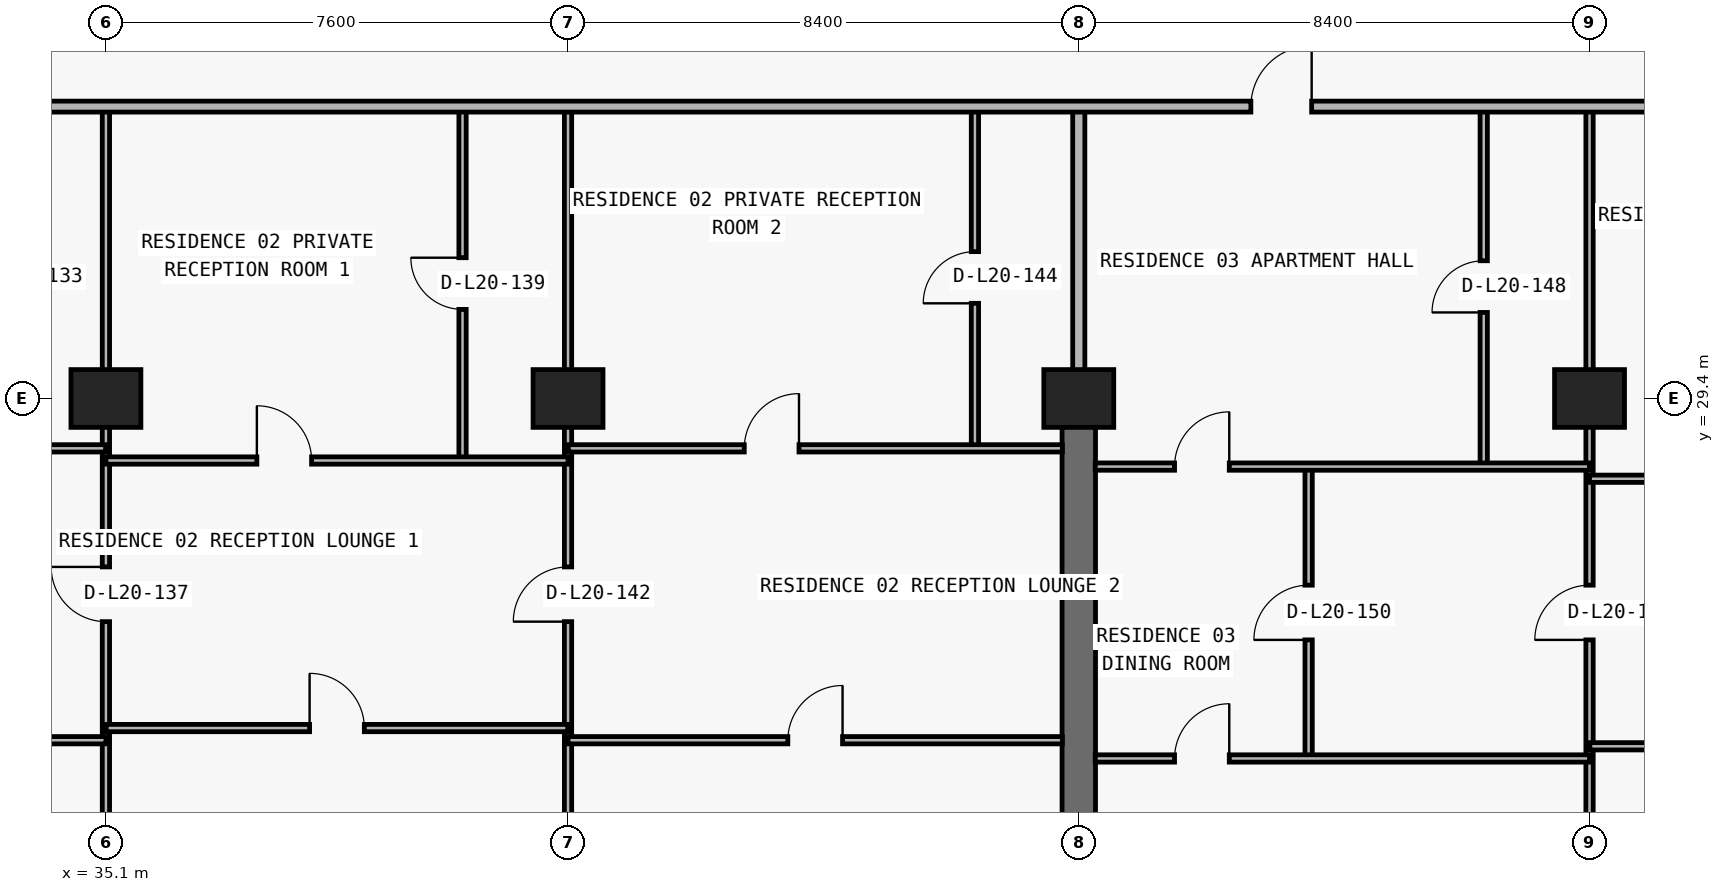
"""IFC4 building model, lengths in metres.
Left out: names, types, materials, properties, quantities, classifications, styles, units other than length and angle.
Written with IfcOpenShell. Run it as: python <this file> out.ifc"""

import sys

from ifc_helpers import new_model, si_unit, direction, frame, frame_2d, origin, origin_2d, place, context, subcontext, project, spatial, rectangle, extrude, element, fill, save


model = new_model("IFC4")
c1 = context("Model", 3, precision=1e-05, world=origin(), true_north=direction((0.0, 1.0)))
c2 = subcontext(c1, "Body", "Model", "MODEL_VIEW")
j1 = project(units=[si_unit("LENGTHUNIT", "METRE"), si_unit("PLANEANGLEUNIT", "RADIAN")], contexts=[c1])
p1 = place(None, origin())
s1 = spatial("IfcSite", under=j1, at=p1, CompositionType="ELEMENT")
p2 = place(p1, origin())
s2 = spatial("IfcBuilding", under=s1, at=p2, CompositionType="ELEMENT")
p3 = place(p2, frame((0.0, 0.0, 76.2)))
s3 = spatial("IfcBuildingStorey", under=s2, at=p3, CompositionType="ELEMENT", Elevation=76.2)
for number, where, z_axis, x_axis in (
    (1, (35.1, 29.4, 0.0), (0.0, 0.0, 1.0), (1.0, 0.0, 0.0)),
    (2, (42.7, 29.4, 0.0), (0.0, 0.0, 1.0), (1.0, 0.0, 0.0)),
    (3, (51.1, 29.4, 0.0), (0.0, 0.0, 1.0), (1.0, 0.0, 0.0)),
    (4, (59.5, 29.4, 0.0), (0.0, 0.0, 1.0), (1.0, 0.0, 0.0)),
):
    element("IfcColumn", number, at=place(p3, frame(where, z_axis=z_axis, x_axis=x_axis)), inside=s3, PredefinedType="COLUMN", context=c2, shape_type="SweptSolid", body=[
        extrude(rectangle(XDim=1.15, YDim=0.95, at=origin_2d()), origin(), (0.0, 0.0, 1.0), 3.0),
    ])
p4 = place(p3, frame((51.1, 20.8, 0.0), z_axis=(0.0, 0.0, 1.0), x_axis=(0.0, 1.0, 0.0)))
e5 = element("IfcWall", 5, at=p4, inside=s3, PredefinedType="SHEAR", context=c2, shape_type="SweptSolid", body=[
    extrude(rectangle(XDim=8.6, YDim=0.55, at=frame_2d((4.3, 0.0))), origin(), (0.0, 0.0, 1.0), 3.0),
])
p5 = place(p3, frame((35.1, 6.24, 0.0), z_axis=(0.0, 0.0, 1.0), x_axis=(0.0, 1.0, 0.0)))
e6 = element("IfcWall", 6, at=p5, inside=s3, PredefinedType="PARTITIONING", context=c2, shape_type="SweptSolid", body=[
    extrude(rectangle(XDim=27.96, YDim=0.12, at=frame_2d((13.98, 0.0))), origin(), (0.0, 0.0, 1.0), 2.06),
])
p6 = place(p5, frame((19.49, 0.0, 0.0)))
e7 = element("IfcOpeningElement", 7, at=p6, cuts=e6, PredefinedType="OPENING", context=c2, shape_type="SweptSolid", body=[
    extrude(rectangle(XDim=0.9, YDim=2.01, at=frame_2d((0.45, 1.005))), frame((0.0, 0.07, 0.0), z_axis=(0.0, -1.0, 0.0), x_axis=(1.0, 0.0, 0.0)), (0.0, 0.0, 1.0), 0.14),
])
p7 = place(p3, frame((40.965, 28.38, 0.0), z_axis=(0.0, 0.0, 1.0), x_axis=(0.0, 1.0, 0.0)))
e8 = element("IfcWall", 8, at=p7, inside=s3, PredefinedType="PARTITIONING", context=c2, shape_type="SweptSolid", body=[
    extrude(rectangle(XDim=5.82, YDim=0.12, at=frame_2d((2.91, 0.0))), origin(), (0.0, 0.0, 1.0), 3.0),
])
p8 = place(p7, frame((2.485, 0.0, 0.0)))
e9 = element("IfcOpeningElement", 9, at=p8, cuts=e8, PredefinedType="OPENING", context=c2, shape_type="SweptSolid", body=[
    extrude(rectangle(XDim=0.85, YDim=2.1, at=frame_2d((0.425, 1.05))), frame((0.0, 0.07, 0.0), z_axis=(0.0, -1.0, 0.0), x_axis=(1.0, 0.0, 0.0)), (0.0, 0.0, 1.0), 0.14),
])
p9 = place(p3, frame((42.7, 6.24, 0.0), z_axis=(0.0, 0.0, 1.0), x_axis=(0.0, 1.0, 0.0)))
e10 = element("IfcWall", 10, at=p9, inside=s3, PredefinedType="PARTITIONING", context=c2, shape_type="SweptSolid", body=[
    extrude(rectangle(XDim=27.96, YDim=0.12, at=frame_2d((13.98, 0.0))), origin(), (0.0, 0.0, 1.0), 2.06),
])
p10 = place(p9, frame((19.49, 0.0, 0.0)))
e11 = element("IfcOpeningElement", 11, at=p10, cuts=e10, PredefinedType="OPENING", context=c2, shape_type="SweptSolid", body=[
    extrude(rectangle(XDim=0.9, YDim=2.01, at=frame_2d((0.45, 1.005))), frame((0.0, 0.07, 0.0), z_axis=(0.0, -1.0, 0.0), x_axis=(1.0, 0.0, 0.0)), (0.0, 0.0, 1.0), 0.14),
])
p11 = place(p3, frame((49.392, 28.58, 0.0), z_axis=(0.0, 0.0, 1.0), x_axis=(0.0, 1.0, 0.0)))
e12 = element("IfcWall", 12, at=p11, inside=s3, PredefinedType="PARTITIONING", context=c2, shape_type="SweptSolid", body=[
    extrude(rectangle(XDim=5.62, YDim=0.12, at=frame_2d((2.81, 0.0))), origin(), (0.0, 0.0, 1.0), 3.0),
])
p12 = place(p11, frame((2.385, 0.0, 0.0)))
e13 = element("IfcOpeningElement", 13, at=p12, cuts=e12, PredefinedType="OPENING", context=c2, shape_type="SweptSolid", body=[
    extrude(rectangle(XDim=0.85, YDim=2.1, at=frame_2d((0.425, 1.05))), frame((0.0, 0.07, 0.0), z_axis=(0.0, -1.0, 0.0), x_axis=(1.0, 0.0, 0.0)), (0.0, 0.0, 1.0), 0.14),
])
p13 = place(p3, frame((51.1, 29.405, 0.0), z_axis=(0.0, 0.0, 1.0), x_axis=(0.0, 1.0, 0.0)))
e14 = element("IfcWall", 14, at=p13, inside=s3, PredefinedType="PARTITIONING", context=c2, shape_type="SweptSolid", body=[
    extrude(rectangle(XDim=4.795, YDim=0.2, at=frame_2d((2.397, 0.0))), origin(), (0.0, 0.0, 1.0), 2.285),
])
p14 = place(p3, frame((54.88, 23.48, 0.0), z_axis=(0.0, 0.0, 1.0), x_axis=(0.0, 1.0, 0.0)))
e15 = element("IfcWall", 15, at=p14, inside=s3, PredefinedType="PARTITIONING", context=c2, shape_type="SweptSolid", body=[
    extrude(rectangle(XDim=4.8, YDim=0.12, at=frame_2d((2.4, 0.0))), origin(), (0.0, 0.0, 1.0), 3.0),
])
p15 = place(p14, frame((1.95, 0.0, 0.0)))
e16 = element("IfcOpeningElement", 16, at=p15, cuts=e15, PredefinedType="OPENING", context=c2, shape_type="SweptSolid", body=[
    extrude(rectangle(XDim=0.9, YDim=2.15, at=frame_2d((0.45, 1.075))), frame((0.0, 0.07, 0.0), z_axis=(0.0, -1.0, 0.0), x_axis=(1.0, 0.0, 0.0)), (0.0, 0.0, 1.0), 0.14),
])
p16 = place(p3, frame((57.76, 28.28, 0.0), z_axis=(0.0, 0.0, 1.0), x_axis=(0.0, 1.0, 0.0)))
e17 = element("IfcWall", 17, at=p16, inside=s3, PredefinedType="PARTITIONING", context=c2, shape_type="SweptSolid", body=[
    extrude(rectangle(XDim=5.92, YDim=0.12, at=frame_2d((2.96, 0.0))), origin(), (0.0, 0.0, 1.0), 3.0),
])
p17 = place(p16, frame((2.535, 0.0, 0.0)))
e18 = element("IfcOpeningElement", 18, at=p17, cuts=e17, PredefinedType="OPENING", context=c2, shape_type="SweptSolid", body=[
    extrude(rectangle(XDim=0.85, YDim=2.1, at=frame_2d((0.425, 1.05))), frame((0.0, 0.07, 0.0), z_axis=(0.0, -1.0, 0.0), x_axis=(1.0, 0.0, 0.0)), (0.0, 0.0, 1.0), 0.14),
])
p18 = place(p3, frame((59.5, 6.24, 0.0), z_axis=(0.0, 0.0, 1.0), x_axis=(0.0, 1.0, 0.0)))
e19 = element("IfcWall", 19, at=p18, inside=s3, PredefinedType="PARTITIONING", context=c2, shape_type="SweptSolid", body=[
    extrude(rectangle(XDim=27.96, YDim=0.12, at=frame_2d((13.98, 0.0))), origin(), (0.0, 0.0, 1.0), 2.06),
])
p19 = place(p18, frame((19.19, 0.0, 0.0)))
e20 = element("IfcOpeningElement", 20, at=p19, cuts=e19, PredefinedType="OPENING", context=c2, shape_type="SweptSolid", body=[
    extrude(rectangle(XDim=0.9, YDim=2.01, at=frame_2d((0.45, 1.005))), frame((0.0, 0.07, 0.0), z_axis=(0.0, -1.0, 0.0), x_axis=(1.0, 0.0, 0.0)), (0.0, 0.0, 1.0), 0.14),
])
p20 = place(p3, frame((51.37, 23.48, 0.0), z_axis=(0.0, 0.0, 1.0), x_axis=(1.0, 0.0, 0.0)))
e21 = element("IfcWall", 21, at=p20, inside=s3, PredefinedType="PARTITIONING", context=c2, shape_type="SweptSolid", body=[
    extrude(rectangle(XDim=8.13, YDim=0.12, at=frame_2d((4.065, 0.0))), origin(), (0.0, 0.0, 1.0), 3.0),
])
p21 = place(p20, frame((1.305, 0.0, 0.0)))
e22 = element("IfcOpeningElement", 22, at=p21, cuts=e21, PredefinedType="OPENING", context=c2, shape_type="SweptSolid", body=[
    extrude(rectangle(XDim=0.9, YDim=2.15, at=frame_2d((0.45, 1.075))), frame((0.0, 0.07, 0.0), z_axis=(0.0, -1.0, 0.0), x_axis=(1.0, 0.0, 0.0)), (0.0, 0.0, 1.0), 0.14),
])
p22 = place(p3, frame((59.505, 23.68, 0.0), z_axis=(0.0, 0.0, 1.0), x_axis=(1.0, 0.0, 0.0)))
e23 = element("IfcWall", 23, at=p22, inside=s3, PredefinedType="PARTITIONING", context=c2, shape_type="SweptSolid", body=[
    extrude(rectangle(XDim=8.395, YDim=0.12, at=frame_2d((4.198, 0.0))), origin(), (0.0, 0.0, 1.0), 3.0),
])
p23 = place(p22, frame((3.748, 0.0, 0.0)))
e24 = element("IfcOpeningElement", 24, at=p23, cuts=e23, PredefinedType="OPENING", context=c2, shape_type="SweptSolid", body=[
    extrude(rectangle(XDim=0.9, YDim=2.15, at=frame_2d((0.45, 1.075))), frame((0.0, 0.07, 0.0), z_axis=(0.0, -1.0, 0.0), x_axis=(1.0, 0.0, 0.0)), (0.0, 0.0, 1.0), 0.14),
])
p24 = place(p3, frame((26.97, 23.78, 0.0), z_axis=(0.0, 0.0, 1.0), x_axis=(1.0, 0.0, 0.0)))
e25 = element("IfcWall", 25, at=p24, inside=s3, PredefinedType="PARTITIONING", context=c2, shape_type="SweptSolid", body=[
    extrude(rectangle(XDim=8.13, YDim=0.12, at=frame_2d((4.065, 0.0))), origin(), (0.0, 0.0, 1.0), 3.0),
])
p25 = place(p24, frame((1.179, 0.0, 0.0)))
e26 = element("IfcOpeningElement", 26, at=p25, cuts=e25, PredefinedType="OPENING", context=c2, shape_type="SweptSolid", body=[
    extrude(rectangle(XDim=0.9, YDim=2.15, at=frame_2d((0.45, 1.075))), frame((0.0, 0.07, 0.0), z_axis=(0.0, -1.0, 0.0), x_axis=(1.0, 0.0, 0.0)), (0.0, 0.0, 1.0), 0.14),
])
p26 = place(p3, frame((42.7, 23.78, 0.0), z_axis=(0.0, 0.0, 1.0), x_axis=(1.0, 0.0, 0.0)))
e27 = element("IfcWall", 27, at=p26, inside=s3, PredefinedType="PARTITIONING", context=c2, shape_type="SweptSolid", body=[
    extrude(rectangle(XDim=8.13, YDim=0.12, at=frame_2d((4.065, 0.0))), origin(), (0.0, 0.0, 1.0), 3.0),
])
p27 = place(p26, frame((3.615, 0.0, 0.0)))
e28 = element("IfcOpeningElement", 28, at=p27, cuts=e27, PredefinedType="OPENING", context=c2, shape_type="SweptSolid", body=[
    extrude(rectangle(XDim=0.9, YDim=2.15, at=frame_2d((0.45, 1.075))), frame((0.0, 0.07, 0.0), z_axis=(0.0, -1.0, 0.0), x_axis=(1.0, 0.0, 0.0)), (0.0, 0.0, 1.0), 0.14),
])
p28 = place(p3, frame((35.105, 23.98, 0.0), z_axis=(0.0, 0.0, 1.0), x_axis=(1.0, 0.0, 0.0)))
e29 = element("IfcWall", 29, at=p28, inside=s3, PredefinedType="PARTITIONING", context=c2, shape_type="SweptSolid", body=[
    extrude(rectangle(XDim=7.59, YDim=0.12, at=frame_2d((3.795, 0.0))), origin(), (0.0, 0.0, 1.0), 3.0),
])
p29 = place(p28, frame((3.345, 0.0, 0.0)))
e30 = element("IfcOpeningElement", 30, at=p29, cuts=e29, PredefinedType="OPENING", context=c2, shape_type="SweptSolid", body=[
    extrude(rectangle(XDim=0.9, YDim=2.15, at=frame_2d((0.45, 1.075))), frame((0.0, 0.07, 0.0), z_axis=(0.0, -1.0, 0.0), x_axis=(1.0, 0.0, 0.0)), (0.0, 0.0, 1.0), 0.14),
])
p30 = place(p3, frame((59.5, 28.08, 0.0), z_axis=(0.0, 0.0, 1.0), x_axis=(1.0, 0.0, 0.0)))
e31 = element("IfcWall", 31, at=p30, inside=s3, PredefinedType="PARTITIONING", context=c2, shape_type="SweptSolid", body=[
    extrude(rectangle(XDim=8.4, YDim=0.12, at=frame_2d((4.2, 0.0))), origin(), (0.0, 0.0, 1.0), 3.0),
])
p31 = place(p30, frame((2.966, 0.0, 0.0)))
e32 = element("IfcOpeningElement", 32, at=p31, cuts=e31, PredefinedType="OPENING", context=c2, shape_type="SweptSolid", body=[
    extrude(rectangle(XDim=0.9, YDim=2.15, at=frame_2d((0.45, 1.075))), frame((0.0, 0.07, 0.0), z_axis=(0.0, -1.0, 0.0), x_axis=(1.0, 0.0, 0.0)), (0.0, 0.0, 1.0), 0.14),
])
p32 = place(p3, frame((51.37, 28.28, 0.0), z_axis=(0.0, 0.0, 1.0), x_axis=(1.0, 0.0, 0.0)))
e33 = element("IfcWall", 33, at=p32, inside=s3, PredefinedType="PARTITIONING", context=c2, shape_type="SweptSolid", body=[
    extrude(rectangle(XDim=8.13, YDim=0.12, at=frame_2d((4.065, 0.0))), origin(), (0.0, 0.0, 1.0), 3.0),
])
p33 = place(p32, frame((1.305, 0.0, 0.0)))
e34 = element("IfcOpeningElement", 34, at=p33, cuts=e33, PredefinedType="OPENING", context=c2, shape_type="SweptSolid", body=[
    extrude(rectangle(XDim=0.9, YDim=2.15, at=frame_2d((0.45, 1.075))), frame((0.0, 0.07, 0.0), z_axis=(0.0, -1.0, 0.0), x_axis=(1.0, 0.0, 0.0)), (0.0, 0.0, 1.0), 0.14),
])
p34 = place(p3, frame((35.1, 28.38, 0.0), z_axis=(0.0, 0.0, 1.0), x_axis=(1.0, 0.0, 0.0)))
e35 = element("IfcWall", 35, at=p34, inside=s3, PredefinedType="PARTITIONING", context=c2, shape_type="SweptSolid", body=[
    extrude(rectangle(XDim=7.6, YDim=0.12, at=frame_2d((3.8, 0.0))), origin(), (0.0, 0.0, 1.0), 3.0),
])
p35 = place(p34, frame((2.482, 0.0, 0.0)))
e36 = element("IfcOpeningElement", 36, at=p35, cuts=e35, PredefinedType="OPENING", context=c2, shape_type="SweptSolid", body=[
    extrude(rectangle(XDim=0.9, YDim=2.15, at=frame_2d((0.45, 1.075))), frame((0.0, 0.07, 0.0), z_axis=(0.0, -1.0, 0.0), x_axis=(1.0, 0.0, 0.0)), (0.0, 0.0, 1.0), 0.14),
])
p36 = place(p3, frame((26.97, 28.58, 0.0), z_axis=(0.0, 0.0, 1.0), x_axis=(1.0, 0.0, 0.0)))
e37 = element("IfcWall", 37, at=p36, inside=s3, PredefinedType="PARTITIONING", context=c2, shape_type="SweptSolid", body=[
    extrude(rectangle(XDim=8.125, YDim=0.12, at=frame_2d((4.062, 0.0))), origin(), (0.0, 0.0, 1.0), 3.0),
])
p37 = place(p36, frame((1.179, 0.0, 0.0)))
e38 = element("IfcOpeningElement", 38, at=p37, cuts=e37, PredefinedType="OPENING", context=c2, shape_type="SweptSolid", body=[
    extrude(rectangle(XDim=0.9, YDim=2.15, at=frame_2d((0.45, 1.075))), frame((0.0, 0.07, 0.0), z_axis=(0.0, -1.0, 0.0), x_axis=(1.0, 0.0, 0.0)), (0.0, 0.0, 1.0), 0.14),
])
p38 = place(p3, frame((42.705, 28.58, 0.0), z_axis=(0.0, 0.0, 1.0), x_axis=(1.0, 0.0, 0.0)))
e39 = element("IfcWall", 39, at=p38, inside=s3, PredefinedType="PARTITIONING", context=c2, shape_type="SweptSolid", body=[
    extrude(rectangle(XDim=8.125, YDim=0.12, at=frame_2d((4.062, 0.0))), origin(), (0.0, 0.0, 1.0), 3.0),
])
p39 = place(p38, frame((2.894, 0.0, 0.0)))
e40 = element("IfcOpeningElement", 40, at=p39, cuts=e39, PredefinedType="OPENING", context=c2, shape_type="SweptSolid", body=[
    extrude(rectangle(XDim=0.9, YDim=2.15, at=frame_2d((0.45, 1.075))), frame((0.0, 0.07, 0.0), z_axis=(0.0, -1.0, 0.0), x_axis=(1.0, 0.0, 0.0)), (0.0, 0.0, 1.0), 0.14),
])
p40 = place(p3, frame((5.105, 34.2, 0.0), z_axis=(0.0, 0.0, 1.0), x_axis=(1.0, 0.0, 0.0)))
e41 = element("IfcWall", 41, at=p40, inside=s3, PredefinedType="PARTITIONING", context=c2, shape_type="SweptSolid", body=[
    extrude(rectangle(XDim=67.595, YDim=0.18, at=frame_2d((33.797, 0.0))), origin(), (0.0, 0.0, 1.0), 3.0),
])
p41 = place(p40, frame((7.639, 0.0, 0.0)))
e42 = element("IfcOpeningElement", 42, at=p41, cuts=e41, PredefinedType="OPENING", context=c2, shape_type="SweptSolid", body=[
    extrude(rectangle(XDim=1.0, YDim=2.2, at=frame_2d((0.5, 1.1))), frame((0.0, 0.1, 0.0), z_axis=(0.0, -1.0, 0.0), x_axis=(1.0, 0.0, 0.0)), (0.0, 0.0, 1.0), 0.2),
])
p42 = place(p40, frame((24.423, 0.0, 0.0)))
e43 = element("IfcOpeningElement", 43, at=p42, cuts=e41, PredefinedType="OPENING", context=c2, shape_type="SweptSolid", body=[
    extrude(rectangle(XDim=1.0, YDim=2.2, at=frame_2d((0.5, 1.1))), frame((0.0, 0.1, 0.0), z_axis=(0.0, -1.0, 0.0), x_axis=(1.0, 0.0, 0.0)), (0.0, 0.0, 1.0), 0.2),
])
p43 = place(p40, frame((48.825, 0.0, 0.0)))
e44 = element("IfcOpeningElement", 44, at=p43, cuts=e41, PredefinedType="OPENING", context=c2, shape_type="SweptSolid", body=[
    extrude(rectangle(XDim=1.0, YDim=2.2, at=frame_2d((0.5, 1.1))), frame((0.0, 0.1, 0.0), z_axis=(0.0, -1.0, 0.0), x_axis=(1.0, 0.0, 0.0)), (0.0, 0.0, 1.0), 0.2),
])
p44 = place(p6, origin())
e45 = element("IfcDoor", 45, at=p44, inside=s3, OperationType="SINGLE_SWING_RIGHT", PredefinedType="DOOR", context=c2, shape_type="SweptSolid", body=[
    extrude(rectangle(XDim=0.9, YDim=2.01, at=frame_2d((0.45, 1.005))), frame((0.0, 0.025, 0.0), z_axis=(0.0, -1.0, 0.0), x_axis=(1.0, 0.0, 0.0)), (0.0, 0.0, 1.0), 0.05),
])
fill(e7, e45)
p45 = place(p35, origin())
e46 = element("IfcDoor", 46, at=p45, inside=s3, OperationType="SINGLE_SWING_LEFT", PredefinedType="DOOR", context=c2, shape_type="SweptSolid", body=[
    extrude(rectangle(XDim=0.9, YDim=2.15, at=frame_2d((0.45, 1.075))), frame((0.0, 0.025, 0.0), z_axis=(0.0, -1.0, 0.0), x_axis=(1.0, 0.0, 0.0)), (0.0, 0.0, 1.0), 0.05),
])
fill(e36, e46)
p46 = place(p8, origin())
e47 = element("IfcDoor", 47, at=p46, inside=s3, OperationType="SINGLE_SWING_RIGHT", PredefinedType="DOOR", context=c2, shape_type="SweptSolid", body=[
    extrude(rectangle(XDim=0.85, YDim=2.1, at=frame_2d((0.425, 1.05))), frame((0.0, 0.025, 0.0), z_axis=(0.0, -1.0, 0.0), x_axis=(1.0, 0.0, 0.0)), (0.0, 0.0, 1.0), 0.05),
])
fill(e9, e47)
p47 = place(p29, origin())
e48 = element("IfcDoor", 48, at=p47, inside=s3, OperationType="SINGLE_SWING_LEFT", PredefinedType="DOOR", context=c2, shape_type="SweptSolid", body=[
    extrude(rectangle(XDim=0.9, YDim=2.15, at=frame_2d((0.45, 1.075))), frame((0.0, 0.025, 0.0), z_axis=(0.0, -1.0, 0.0), x_axis=(1.0, 0.0, 0.0)), (0.0, 0.0, 1.0), 0.05),
])
fill(e30, e48)
p48 = place(p10, origin())
e49 = element("IfcDoor", 49, at=p48, inside=s3, OperationType="SINGLE_SWING_LEFT", PredefinedType="DOOR", context=c2, shape_type="SweptSolid", body=[
    extrude(rectangle(XDim=0.9, YDim=2.01, at=frame_2d((0.45, 1.005))), frame((0.0, 0.025, 0.0), z_axis=(0.0, -1.0, 0.0), x_axis=(1.0, 0.0, 0.0)), (0.0, 0.0, 1.0), 0.05),
])
fill(e11, e49)
p49 = place(p39, origin())
e50 = element("IfcDoor", 50, at=p49, inside=s3, OperationType="SINGLE_SWING_RIGHT", PredefinedType="DOOR", context=c2, shape_type="SweptSolid", body=[
    extrude(rectangle(XDim=0.9, YDim=2.15, at=frame_2d((0.45, 1.075))), frame((0.0, 0.025, 0.0), z_axis=(0.0, -1.0, 0.0), x_axis=(1.0, 0.0, 0.0)), (0.0, 0.0, 1.0), 0.05),
])
fill(e40, e50)
p50 = place(p12, origin())
e51 = element("IfcDoor", 51, at=p50, inside=s3, OperationType="SINGLE_SWING_LEFT", PredefinedType="DOOR", context=c2, shape_type="SweptSolid", body=[
    extrude(rectangle(XDim=0.85, YDim=2.1, at=frame_2d((0.425, 1.05))), frame((0.0, 0.025, 0.0), z_axis=(0.0, -1.0, 0.0), x_axis=(1.0, 0.0, 0.0)), (0.0, 0.0, 1.0), 0.05),
])
fill(e13, e51)
p51 = place(p27, origin())
e52 = element("IfcDoor", 52, at=p51, inside=s3, OperationType="SINGLE_SWING_RIGHT", PredefinedType="DOOR", context=c2, shape_type="SweptSolid", body=[
    extrude(rectangle(XDim=0.9, YDim=2.15, at=frame_2d((0.45, 1.075))), frame((0.0, 0.025, 0.0), z_axis=(0.0, -1.0, 0.0), x_axis=(1.0, 0.0, 0.0)), (0.0, 0.0, 1.0), 0.05),
])
fill(e28, e52)
p52 = place(p43, origin())
e53 = element("IfcDoor", 53, at=p52, inside=s3, OperationType="SINGLE_SWING_RIGHT", PredefinedType="DOOR", context=c2, shape_type="SweptSolid", body=[
    extrude(rectangle(XDim=1.0, YDim=2.2, at=frame_2d((0.5, 1.1))), frame((0.0, 0.025, 0.0), z_axis=(0.0, -1.0, 0.0), x_axis=(1.0, 0.0, 0.0)), (0.0, 0.0, 1.0), 0.05),
])
fill(e44, e53)
p53 = place(p17, origin())
e54 = element("IfcDoor", 54, at=p53, inside=s3, OperationType="SINGLE_SWING_LEFT", PredefinedType="DOOR", context=c2, shape_type="SweptSolid", body=[
    extrude(rectangle(XDim=0.85, YDim=2.1, at=frame_2d((0.425, 1.05))), frame((0.0, 0.025, 0.0), z_axis=(0.0, -1.0, 0.0), x_axis=(1.0, 0.0, 0.0)), (0.0, 0.0, 1.0), 0.05),
])
fill(e18, e54)
p54 = place(p33, origin())
e55 = element("IfcDoor", 55, at=p54, inside=s3, OperationType="SINGLE_SWING_RIGHT", PredefinedType="DOOR", context=c2, shape_type="SweptSolid", body=[
    extrude(rectangle(XDim=0.9, YDim=2.15, at=frame_2d((0.45, 1.075))), frame((0.0, 0.025, 0.0), z_axis=(0.0, -1.0, 0.0), x_axis=(1.0, 0.0, 0.0)), (0.0, 0.0, 1.0), 0.05),
])
fill(e34, e55)
p55 = place(p15, origin())
e56 = element("IfcDoor", 56, at=p55, inside=s3, OperationType="SINGLE_SWING_LEFT", PredefinedType="DOOR", context=c2, shape_type="SweptSolid", body=[
    extrude(rectangle(XDim=0.9, YDim=2.15, at=frame_2d((0.45, 1.075))), frame((0.0, 0.025, 0.0), z_axis=(0.0, -1.0, 0.0), x_axis=(1.0, 0.0, 0.0)), (0.0, 0.0, 1.0), 0.05),
])
fill(e16, e56)
p56 = place(p21, origin())
e57 = element("IfcDoor", 57, at=p56, inside=s3, OperationType="SINGLE_SWING_RIGHT", PredefinedType="DOOR", context=c2, shape_type="SweptSolid", body=[
    extrude(rectangle(XDim=0.9, YDim=2.15, at=frame_2d((0.45, 1.075))), frame((0.0, 0.025, 0.0), z_axis=(0.0, -1.0, 0.0), x_axis=(1.0, 0.0, 0.0)), (0.0, 0.0, 1.0), 0.05),
])
fill(e22, e57)
p57 = place(p19, origin())
e58 = element("IfcDoor", 58, at=p57, inside=s3, OperationType="SINGLE_SWING_LEFT", PredefinedType="DOOR", context=c2, shape_type="SweptSolid", body=[
    extrude(rectangle(XDim=0.9, YDim=2.01, at=frame_2d((0.45, 1.005))), frame((0.0, 0.025, 0.0), z_axis=(0.0, -1.0, 0.0), x_axis=(1.0, 0.0, 0.0)), (0.0, 0.0, 1.0), 0.05),
])
fill(e20, e58)
save(model, sys.argv[1])
